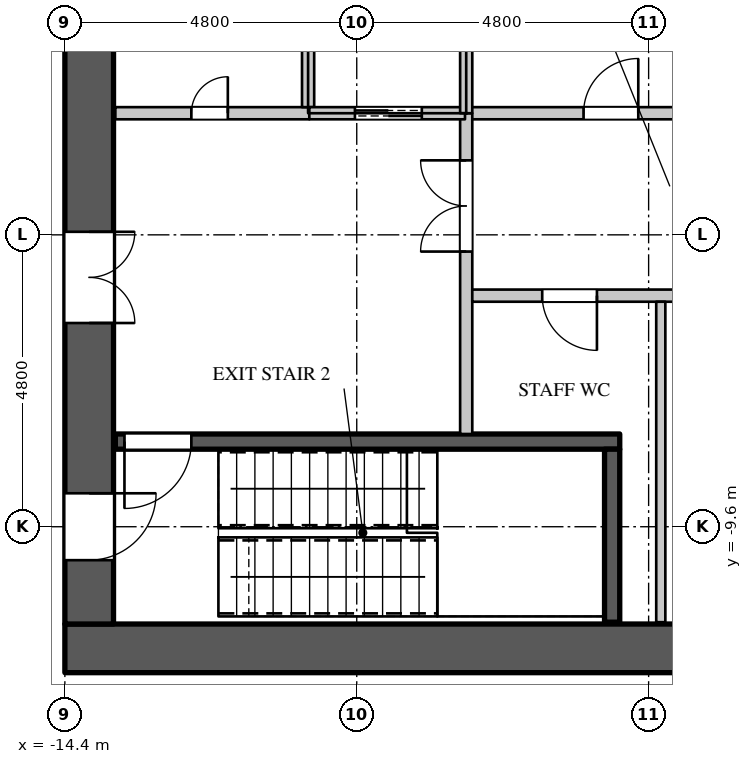
"""IFC4 building model, lengths in metres.
Left out: names, types, materials, properties, quantities, classifications, styles, units other than length and angle.
Written with IfcOpenShell. Run it as: python <this file> out.ifc"""

import sys

from ifc_helpers import new_model, si_unit, direction, frame, frame_2d, origin, place, context, subcontext, project, spatial, rectangle, extrude, element, fill, save


model = new_model("IFC4")
c1 = context("Model", 3, precision=1e-05, world=origin(), true_north=direction((0.0, 1.0)))
c2 = subcontext(c1, "Body", "Model", "MODEL_VIEW")
j1 = project(units=[si_unit("LENGTHUNIT", "METRE"), si_unit("PLANEANGLEUNIT", "RADIAN")], contexts=[c1])
p1 = place(None, origin())
s1 = spatial("IfcSite", under=j1, at=p1, CompositionType="ELEMENT")
p2 = place(p1, origin())
s2 = spatial("IfcBuilding", under=s1, at=p2, CompositionType="ELEMENT")
p3 = place(p2, frame((0.0, 0.0, 131.7)))
s3 = spatial("IfcBuildingStorey", under=s2, at=p3, CompositionType="ELEMENT", Elevation=131.7)
p4 = place(p3, frame((-14.4, -11.6, 0.0), z_axis=(0.0, 0.0, 1.0), x_axis=(1.0, 0.0, 0.0)))
e1 = element("IfcWall", 1, at=p4, inside=s3, PredefinedType="SHEAR", context=c2, shape_type="SweptSolid", body=[
    extrude(rectangle(XDim=28.8, YDim=0.8, at=frame_2d((14.4, 0.0))), origin(), (0.0, 0.0, 1.0), 4.2),
])
p5 = place(p3, frame((-14.0, -11.2, 0.0), z_axis=(0.0, 0.0, 1.0), x_axis=(0.0, 1.0, 0.0)))
e2 = element("IfcWall", 2, at=p5, inside=s3, PredefinedType="SHEAR", context=c2, shape_type="SweptSolid", body=[
    extrude(rectangle(XDim=22.4, YDim=0.8, at=frame_2d((11.2, 0.0))), origin(), (0.0, 0.0, 1.0), 4.2),
])
p6 = place(p5, frame((20.25, 0.0, 0.0)))
e3 = element("IfcOpeningElement", 3, at=p6, cuts=e2, PredefinedType="OPENING", context=c2, shape_type="SweptSolid", body=[
    extrude(rectangle(XDim=1.1, YDim=2.2, at=frame_2d((0.55, 1.1))), frame((0.0, 0.41, 0.0), z_axis=(0.0, -1.0, 0.0), x_axis=(1.0, 0.0, 0.0)), (0.0, 0.0, 1.0), 0.82),
])
p7 = place(p5, frame((1.05, 0.0, 0.0)))
e4 = element("IfcOpeningElement", 4, at=p7, cuts=e2, PredefinedType="OPENING", context=c2, shape_type="SweptSolid", body=[
    extrude(rectangle(XDim=1.1, YDim=2.2, at=frame_2d((0.55, 1.1))), frame((0.0, 0.41, 0.0), z_axis=(0.0, -1.0, 0.0), x_axis=(1.0, 0.0, 0.0)), (0.0, 0.0, 1.0), 0.82),
])
p8 = place(p5, frame((15.95, 0.0, 0.0)))
e5 = element("IfcOpeningElement", 5, at=p8, cuts=e2, PredefinedType="OPENING", context=c2, shape_type="SweptSolid", body=[
    extrude(rectangle(XDim=1.5, YDim=2.4, at=frame_2d((0.75, 1.2))), frame((0.0, 0.41, 0.0), z_axis=(0.0, -1.0, 0.0), x_axis=(1.0, 0.0, 0.0)), (0.0, 0.0, 1.0), 0.82),
])
p9 = place(p5, frame((4.95, 0.0, 0.0)))
e6 = element("IfcOpeningElement", 6, at=p9, cuts=e2, PredefinedType="OPENING", context=c2, shape_type="SweptSolid", body=[
    extrude(rectangle(XDim=1.5, YDim=2.4, at=frame_2d((0.75, 1.2))), frame((0.0, 0.41, 0.0), z_axis=(0.0, -1.0, 0.0), x_axis=(1.0, 0.0, 0.0)), (0.0, 0.0, 1.0), 0.82),
])
p10 = place(p3, frame((-7.82, -2.8, 0.0), z_axis=(0.0, 0.0, 1.0), x_axis=(1.0, 0.0, 0.0)))
e7 = element("IfcWall", 7, at=p10, inside=s3, PredefinedType="PARTITIONING", context=c2, shape_type="SweptSolid", body=[
    extrude(rectangle(XDim=9.84, YDim=0.2, at=frame_2d((4.92, 0.0))), origin(), (0.0, 0.0, 1.0), 3.95),
])
p11 = place(p10, frame((1.95, 0.0, 0.0)))
e8 = element("IfcOpeningElement", 8, at=p11, cuts=e7, PredefinedType="OPENING", context=c2, shape_type="SweptSolid", body=[
    extrude(rectangle(XDim=0.9, YDim=2.2, at=frame_2d((0.45, 1.1))), frame((0.0, 0.11, 0.0), z_axis=(0.0, -1.0, 0.0), x_axis=(1.0, 0.0, 0.0)), (0.0, 0.0, 1.0), 0.22),
])
p12 = place(p10, frame((6.7, 0.0, 0.0)))
e9 = element("IfcOpeningElement", 9, at=p12, cuts=e7, PredefinedType="OPENING", context=c2, shape_type="SweptSolid", body=[
    extrude(rectangle(XDim=0.9, YDim=2.2, at=frame_2d((0.45, 1.1))), frame((0.0, 0.11, 0.0), z_axis=(0.0, -1.0, 0.0), x_axis=(1.0, 0.0, 0.0)), (0.0, 0.0, 1.0), 0.22),
])
p13 = place(p3, frame((-7.8, -8.075, 0.0), z_axis=(0.0, 0.0, 1.0), x_axis=(0.0, 1.0, 0.0)))
e10 = element("IfcWall", 10, at=p13, inside=s3, PredefinedType="PARTITIONING", context=c2, shape_type="SweptSolid", body=[
    extrude(rectangle(XDim=5.275, YDim=0.2, at=frame_2d((2.637, 0.0))), origin(), (0.0, 0.0, 1.0), 3.95),
])
p14 = place(p13, frame((3.0, 0.0, 0.0)))
e11 = element("IfcOpeningElement", 11, at=p14, cuts=e10, PredefinedType="OPENING", context=c2, shape_type="SweptSolid", body=[
    extrude(rectangle(XDim=1.5, YDim=2.4, at=frame_2d((0.75, 1.2))), frame((0.0, 0.11, 0.0), z_axis=(0.0, -1.0, 0.0), x_axis=(1.0, 0.0, 0.0)), (0.0, 0.0, 1.0), 0.22),
])
p15 = place(p3, frame((-7.7, -5.8, 0.0), z_axis=(0.0, 0.0, 1.0), x_axis=(1.0, 0.0, 0.0)))
e12 = element("IfcWall", 12, at=p15, inside=s3, PredefinedType="PARTITIONING", context=c2, shape_type="SweptSolid", body=[
    extrude(rectangle(XDim=6.92, YDim=0.2, at=frame_2d((3.46, 0.0))), origin(), (0.0, 0.0, 1.0), 3.95),
])
p16 = place(p15, frame((1.15, 0.0, 0.0)))
e13 = element("IfcOpeningElement", 13, at=p16, cuts=e12, PredefinedType="OPENING", context=c2, shape_type="SweptSolid", body=[
    extrude(rectangle(XDim=0.9, YDim=2.2, at=frame_2d((0.45, 1.1))), frame((0.0, 0.11, 0.0), z_axis=(0.0, -1.0, 0.0), x_axis=(1.0, 0.0, 0.0)), (0.0, 0.0, 1.0), 0.22),
])
p17 = place(p15, frame((4.5, 0.0, 0.0)))
e14 = element("IfcOpeningElement", 14, at=p17, cuts=e12, PredefinedType="OPENING", context=c2, shape_type="SweptSolid", body=[
    extrude(rectangle(XDim=0.9, YDim=2.2, at=frame_2d((0.45, 1.1))), frame((0.0, 0.11, 0.0), z_axis=(0.0, -1.0, 0.0), x_axis=(1.0, 0.0, 0.0)), (0.0, 0.0, 1.0), 0.22),
])
p18 = place(p3, frame((-4.6, -11.17, 0.0), z_axis=(0.0, 0.0, 1.0), x_axis=(0.0, 1.0, 0.0)))
e15 = element("IfcWall", 15, at=p18, inside=s3, PredefinedType="PARTITIONING", context=c2, shape_type="SweptSolid", body=[
    extrude(rectangle(XDim=5.27, YDim=0.15, at=frame_2d((2.635, 0.0))), origin(), (0.0, 0.0, 1.0), 3.95),
])
p19 = place(p3, frame((-13.57, -2.8, 0.0), z_axis=(0.0, 0.0, 1.0), x_axis=(1.0, 0.0, 0.0)))
e16 = element("IfcWall", 16, at=p19, inside=s3, PredefinedType="PARTITIONING", context=c2, shape_type="SweptSolid", body=[
    extrude(rectangle(XDim=3.19, YDim=0.2, at=frame_2d((1.595, 0.0))), origin(), (0.0, 0.0, 1.0), 3.95),
])
p20 = place(p19, frame((1.25, 0.0, 0.0)))
e17 = element("IfcOpeningElement", 17, at=p20, cuts=e16, PredefinedType="OPENING", context=c2, shape_type="SweptSolid", body=[
    extrude(rectangle(XDim=0.6, YDim=2.0, at=frame_2d((0.3, 1.0))), frame((0.0, 0.11, 0.0), z_axis=(0.0, -1.0, 0.0), x_axis=(1.0, 0.0, 0.0)), (0.0, 0.0, 1.0), 0.22),
])
p21 = place(p3, frame((-10.4, -2.7, 0.0), z_axis=(0.0, 0.0, 1.0), x_axis=(0.0, 1.0, 0.0)))
e18 = element("IfcWall", 18, at=p21, inside=s3, PredefinedType="PARTITIONING", context=c2, shape_type="SweptSolid", body=[
    extrude(rectangle(XDim=2.7, YDim=0.2, at=frame_2d((1.35, 0.0))), origin(), (0.0, 0.0, 1.0), 3.95),
])
p22 = place(p3, frame((-10.38, -2.8, 0.0), z_axis=(0.0, 0.0, 1.0), x_axis=(1.0, 0.0, 0.0)))
e19 = element("IfcWall", 19, at=p22, inside=s3, PredefinedType="PARTITIONING", context=c2, shape_type="SweptSolid", body=[
    extrude(rectangle(XDim=2.56, YDim=0.2, at=frame_2d((1.28, 0.0))), origin(), (0.0, 0.0, 1.0), 3.95),
])
p23 = place(p22, frame((0.75, 0.0, 0.0)))
e20 = element("IfcOpeningElement", 20, at=p23, cuts=e19, PredefinedType="OPENING", context=c2, shape_type="SweptSolid", body=[
    extrude(rectangle(XDim=1.1, YDim=2.2, at=frame_2d((0.55, 1.1))), frame((0.0, 0.11, 0.0), z_axis=(0.0, -1.0, 0.0), x_axis=(1.0, 0.0, 0.0)), (0.0, 0.0, 1.0), 0.22),
])
p24 = place(p3, frame((-7.8, -2.8, 0.0), z_axis=(0.0, 0.0, 1.0), x_axis=(0.0, 1.0, 0.0)))
e21 = element("IfcWall", 21, at=p24, inside=s3, PredefinedType="PARTITIONING", context=c2, shape_type="SweptSolid", body=[
    extrude(rectangle(XDim=2.8, YDim=0.2, at=frame_2d((1.4, 0.0))), origin(), (0.0, 0.0, 1.0), 3.95),
])
p25 = place(p3, frame((-13.57, -8.2, 0.0), z_axis=(0.0, 0.0, 1.0), x_axis=(1.0, 0.0, 0.0)))
e22 = element("IfcWall", 22, at=p25, inside=s3, PredefinedType="SHEAR", context=c2, shape_type="SweptSolid", body=[
    extrude(rectangle(XDim=8.295, YDim=0.25, at=frame_2d((4.147, 0.0))), origin(), (0.0, 0.0, 1.0), 3.95),
])
p26 = place(p25, frame((0.15, 0.0, 0.0)))
e23 = element("IfcOpeningElement", 23, at=p26, cuts=e22, PredefinedType="OPENING", context=c2, shape_type="SweptSolid", body=[
    extrude(rectangle(XDim=1.1, YDim=2.2, at=frame_2d((0.55, 1.1))), frame((0.0, 0.135, 0.0), z_axis=(0.0, -1.0, 0.0), x_axis=(1.0, 0.0, 0.0)), (0.0, 0.0, 1.0), 0.27),
])
p27 = place(p3, frame((-5.4, -11.17, 0.0), z_axis=(0.0, 0.0, 1.0), x_axis=(0.0, 1.0, 0.0)))
e24 = element("IfcWall", 24, at=p27, inside=s3, PredefinedType="SHEAR", context=c2, shape_type="SweptSolid", body=[
    extrude(rectangle(XDim=2.845, YDim=0.25, at=frame_2d((1.422, 0.0))), origin(), (0.0, 0.0, 1.0), 3.95),
])
p28 = place(p20, origin())
e25 = element("IfcDoor", 25, at=p28, inside=s3, OperationType="SINGLE_SWING_RIGHT", PredefinedType="DOOR", context=c2, shape_type="SweptSolid", body=[
    extrude(rectangle(XDim=0.6, YDim=2.0, at=frame_2d((0.3, 1.0))), frame((0.0, 0.025, 0.0), z_axis=(0.0, -1.0, 0.0), x_axis=(1.0, 0.0, 0.0)), (0.0, 0.0, 1.0), 0.05),
])
fill(e17, e25)
p29 = place(p16, origin())
e26 = element("IfcDoor", 26, at=p29, inside=s3, OperationType="SINGLE_SWING_LEFT", PredefinedType="DOOR", context=c2, shape_type="SweptSolid", body=[
    extrude(rectangle(XDim=0.9, YDim=2.2, at=frame_2d((0.45, 1.1))), frame((0.0, 0.025, 0.0), z_axis=(0.0, -1.0, 0.0), x_axis=(1.0, 0.0, 0.0)), (0.0, 0.0, 1.0), 0.05),
])
fill(e13, e26)
p30 = place(p11, origin())
e27 = element("IfcDoor", 27, at=p30, inside=s3, OperationType="SINGLE_SWING_RIGHT", PredefinedType="DOOR", context=c2, shape_type="SweptSolid", body=[
    extrude(rectangle(XDim=0.9, YDim=2.2, at=frame_2d((0.45, 1.1))), frame((0.0, 0.025, 0.0), z_axis=(0.0, -1.0, 0.0), x_axis=(1.0, 0.0, 0.0)), (0.0, 0.0, 1.0), 0.05),
])
fill(e8, e27)
p31 = place(p23, origin())
e28 = element("IfcDoor", 28, at=p31, inside=s3, OperationType="DOUBLE_DOOR_SLIDING", PredefinedType="DOOR", context=c2, shape_type="SweptSolid", body=[
    extrude(rectangle(XDim=1.1, YDim=2.2, at=frame_2d((0.55, 1.1))), frame((0.0, 0.025, 0.0), z_axis=(0.0, -1.0, 0.0), x_axis=(1.0, 0.0, 0.0)), (0.0, 0.0, 1.0), 0.05),
])
fill(e20, e28)
p32 = place(p26, origin())
e29 = element("IfcDoor", 29, at=p32, inside=s3, OperationType="SINGLE_SWING_RIGHT", PredefinedType="DOOR", context=c2, shape_type="SweptSolid", body=[
    extrude(rectangle(XDim=1.1, YDim=2.2, at=frame_2d((0.55, 1.1))), frame((0.0, 0.025, 0.0), z_axis=(0.0, -1.0, 0.0), x_axis=(1.0, 0.0, 0.0)), (0.0, 0.0, 1.0), 0.05),
])
fill(e23, e29)
p33 = place(p14, origin())
e30 = element("IfcDoor", 30, at=p33, inside=s3, OperationType="DOUBLE_DOOR_SINGLE_SWING", PredefinedType="DOOR", context=c2, shape_type="SweptSolid", body=[
    extrude(rectangle(XDim=1.5, YDim=2.4, at=frame_2d((0.75, 1.2))), frame((0.0, 0.025, 0.0), z_axis=(0.0, -1.0, 0.0), x_axis=(1.0, 0.0, 0.0)), (0.0, 0.0, 1.0), 0.05),
])
fill(e11, e30)
p34 = place(p7, origin())
e31 = element("IfcDoor", 31, at=p34, inside=s3, OperationType="SINGLE_SWING_LEFT", PredefinedType="DOOR", context=c2, shape_type="SweptSolid", body=[
    extrude(rectangle(XDim=1.1, YDim=2.2, at=frame_2d((0.55, 1.1))), frame((0.0, -0.345, 0.0), z_axis=(0.0, -1.0, 0.0), x_axis=(1.0, 0.0, 0.0)), (0.0, 0.0, 1.0), 0.05),
])
fill(e4, e31)
p35 = place(p9, origin())
e32 = element("IfcDoor", 32, at=p35, inside=s3, OperationType="DOUBLE_DOOR_SINGLE_SWING", PredefinedType="DOOR", context=c2, shape_type="SweptSolid", body=[
    extrude(rectangle(XDim=1.5, YDim=2.4, at=frame_2d((0.75, 1.2))), frame((0.0, -0.345, 0.0), z_axis=(0.0, -1.0, 0.0), x_axis=(1.0, 0.0, 0.0)), (0.0, 0.0, 1.0), 0.05),
])
fill(e6, e32)
save(model, sys.argv[1])
